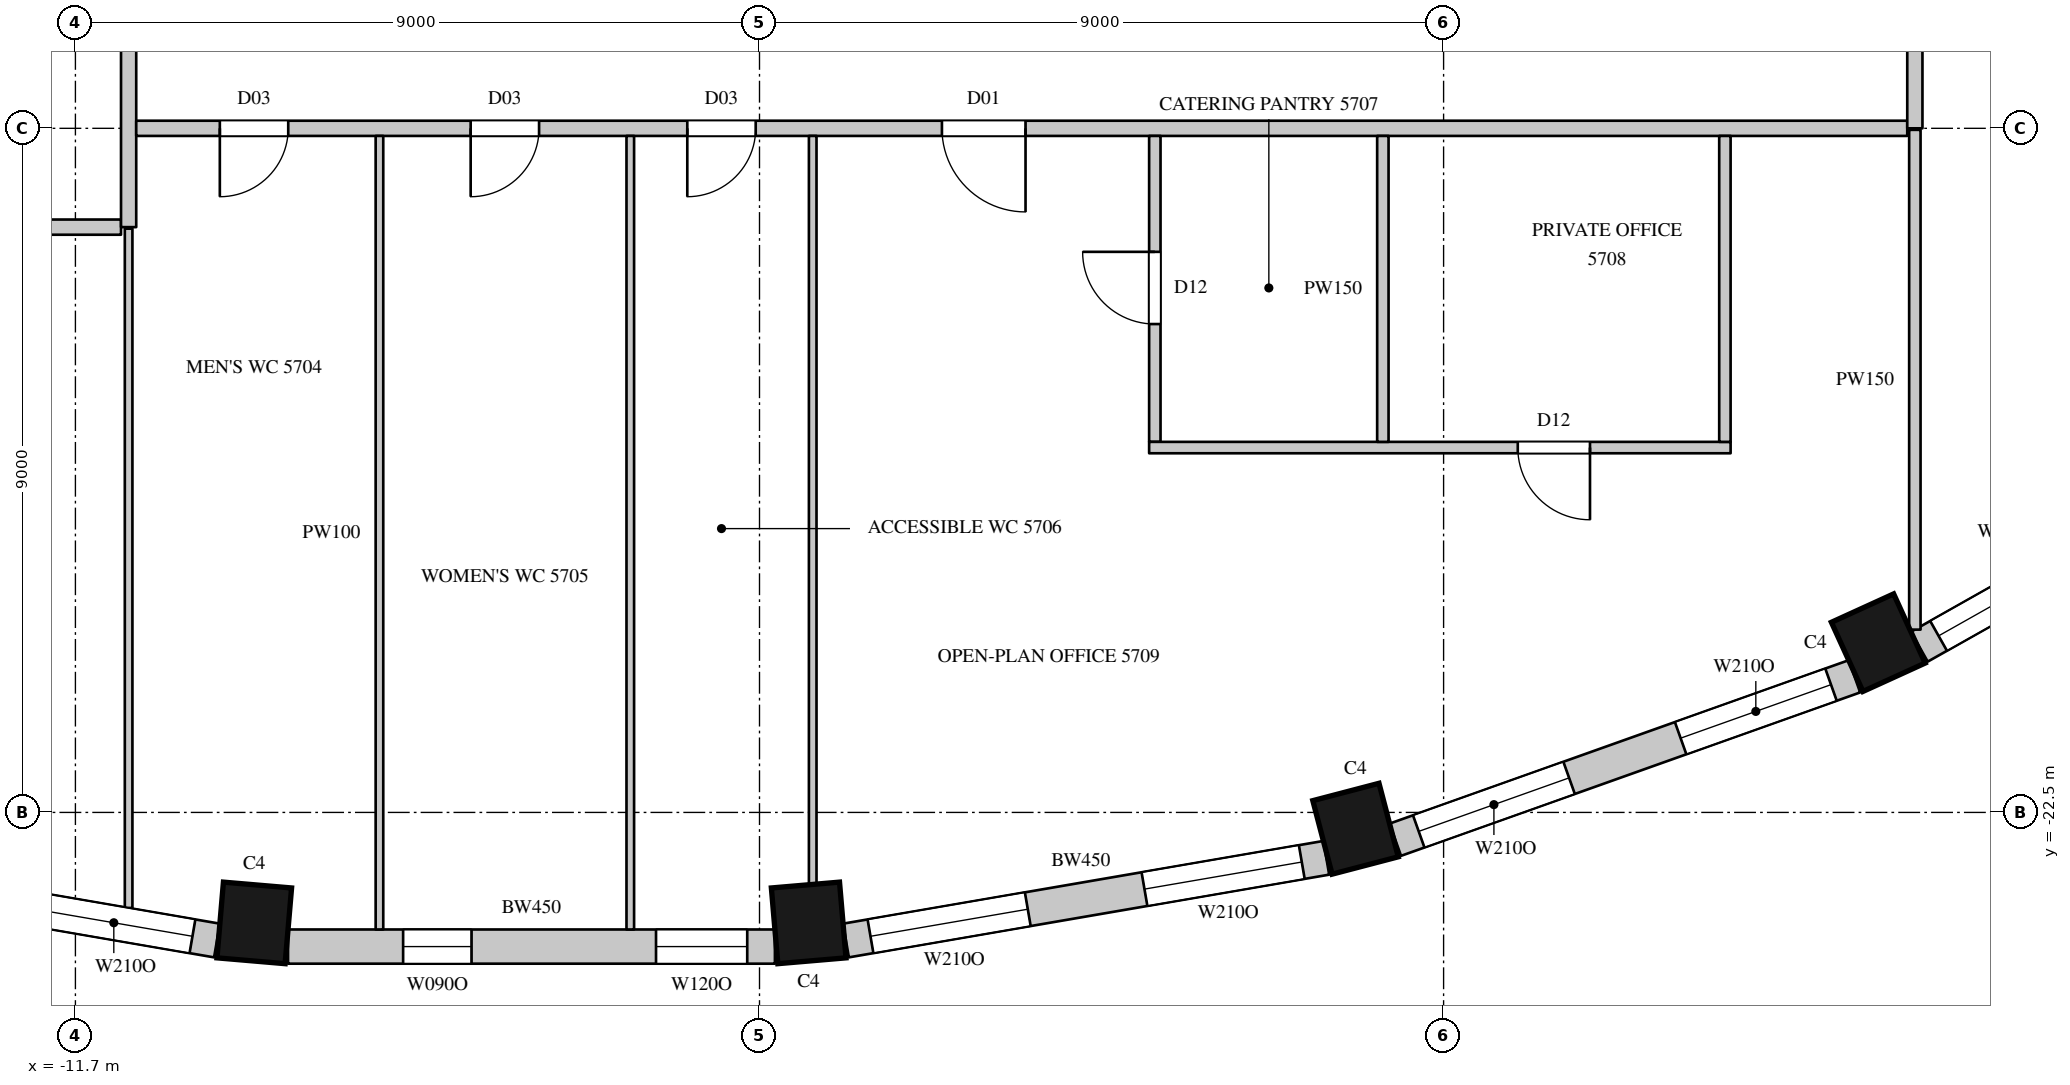
"""IFC4 building model, lengths in metres.
Left out: names, types, materials, properties, quantities, classifications, styles, units other than length and angle.
Written with IfcOpenShell. Run it as: python <this file> out.ifc"""

import sys

from ifc_helpers import new_model, si_unit, direction, frame, frame_2d, origin, origin_2d, place, context, subcontext, project, spatial, rectangle, extrude, element, fill, save


model = new_model("IFC4")
c1 = context("Model", 3, precision=1e-05, world=origin(), true_north=direction((0.0, 1.0)))
c2 = subcontext(c1, "Body", "Model", "MODEL_VIEW")
j1 = project(units=[si_unit("LENGTHUNIT", "METRE"), si_unit("PLANEANGLEUNIT", "RADIAN")], contexts=[c1])
p1 = place(None, origin())
s1 = spatial("IfcSite", under=j1, at=p1, CompositionType="ELEMENT")
p2 = place(p1, origin())
s2 = spatial("IfcBuilding", under=s1, at=p2, CompositionType="ELEMENT")
p3 = place(p2, frame((0.0, 0.0, 255.7)))
s3 = spatial("IfcBuildingStorey", under=s2, at=p3, CompositionType="ELEMENT", Elevation=255.7)
for number, where, z_axis, x_axis in (
    (1, (-9.347, -23.954, 0.0), (0.0, 0.0, 1.0), (0.996, -0.085, 0.0)),
    (2, (-2.053, -23.954, 0.0), (0.0, 0.0, 1.0), (0.996, 0.085, 0.0)),
    (3, (5.142, -22.715, 0.0), (0.0, 0.0, 1.0), (0.967, 0.253, 0.0)),
    (4, (12.019, -20.267, 0.0), (0.0, 0.0, 1.0), (0.91, 0.415, 0.0)),
):
    element("IfcColumn", number, at=place(p3, frame(where, z_axis=z_axis, x_axis=x_axis)), inside=s3, PredefinedType="COLUMN", context=c2, shape_type="SweptSolid", body=[
        extrude(rectangle(XDim=0.9, YDim=1.0, at=origin_2d()), origin(), (0.0, 0.0, 1.0), 4.1),
    ])
p4 = place(p3, frame((-16.157, -23.097, 0.0), z_axis=(0.0, 0.0, 1.0), x_axis=(0.985502073964, -0.169663379113, 0.0)))
e5 = element("IfcWall", 5, at=p4, inside=s3, PredefinedType="SOLIDWALL", context=c2, shape_type="SweptSolid", body=[
    extrude(rectangle(XDim=6.412, YDim=0.45, at=frame_2d((3.206, 0.0))), origin(), (0.0, 0.0, 1.0), 3.8),
])
p5 = place(p4, frame((0.327, 0.0, 1.05)))
e6 = element("IfcOpeningElement", 6, at=p5, cuts=e5, PredefinedType="OPENING", context=c2, shape_type="SweptSolid", body=[
    extrude(rectangle(XDim=2.1, YDim=2.4, at=frame_2d((1.05, 1.2))), frame((0.0, 0.235, 0.0), z_axis=(0.0, -1.0, 0.0), x_axis=(1.0, 0.0, 0.0)), (0.0, 0.0, 1.0), 0.47),
])
p6 = place(p4, frame((3.985, 0.0, 1.05)))
e7 = element("IfcOpeningElement", 7, at=p6, cuts=e5, PredefinedType="OPENING", context=c2, shape_type="SweptSolid", body=[
    extrude(rectangle(XDim=2.1, YDim=2.4, at=frame_2d((1.05, 1.2))), frame((0.0, 0.235, 0.0), z_axis=(0.0, -1.0, 0.0), x_axis=(1.0, 0.0, 0.0)), (0.0, 0.0, 1.0), 0.47),
])
p7 = place(p3, frame((-8.903, -24.265, 0.0), z_axis=(0.0, 0.0, 1.0), x_axis=(1.0, 0.0, 0.0)))
e8 = element("IfcWall", 8, at=p7, inside=s3, PredefinedType="SOLIDWALL", context=c2, shape_type="SweptSolid", body=[
    extrude(rectangle(XDim=6.406, YDim=0.45, at=frame_2d((3.203, 0.0))), origin(), (0.0, 0.0, 1.0), 3.8),
])
p8 = place(p7, frame((1.514, 0.0, 1.05)))
e9 = element("IfcOpeningElement", 9, at=p8, cuts=e8, PredefinedType="OPENING", context=c2, shape_type="SweptSolid", body=[
    extrude(rectangle(XDim=0.9, YDim=2.4, at=frame_2d((0.45, 1.2))), frame((0.0, 0.235, 0.0), z_axis=(0.0, -1.0, 0.0), x_axis=(1.0, 0.0, 0.0)), (0.0, 0.0, 1.0), 0.47),
])
p9 = place(p7, frame((4.841, 0.0, 1.05)))
e10 = element("IfcOpeningElement", 10, at=p9, cuts=e8, PredefinedType="OPENING", context=c2, shape_type="SweptSolid", body=[
    extrude(rectangle(XDim=1.2, YDim=2.4, at=frame_2d((0.6, 1.2))), frame((0.0, 0.235, 0.0), z_axis=(0.0, -1.0, 0.0), x_axis=(1.0, 0.0, 0.0)), (0.0, 0.0, 1.0), 0.47),
])
p10 = place(p3, frame((-1.562, -24.185, 0.0), z_axis=(0.0, 0.0, 1.0), x_axis=(0.985502073964, 0.169663379113, 0.0)))
e11 = element("IfcWall", 11, at=p10, inside=s3, PredefinedType="SOLIDWALL", context=c2, shape_type="SweptSolid", body=[
    extrude(rectangle(XDim=6.412, YDim=0.45, at=frame_2d((3.206, 0.0))), origin(), (0.0, 0.0, 1.0), 3.8),
])
p11 = place(p10, frame((0.327, 0.0, 1.05)))
e12 = element("IfcOpeningElement", 12, at=p11, cuts=e11, PredefinedType="OPENING", context=c2, shape_type="SweptSolid", body=[
    extrude(rectangle(XDim=2.1, YDim=2.4, at=frame_2d((1.05, 1.2))), frame((0.0, 0.235, 0.0), z_axis=(0.0, -1.0, 0.0), x_axis=(1.0, 0.0, 0.0)), (0.0, 0.0, 1.0), 0.47),
])
p12 = place(p10, frame((3.985, 0.0, 1.05)))
e13 = element("IfcOpeningElement", 13, at=p12, cuts=e11, PredefinedType="OPENING", context=c2, shape_type="SweptSolid", body=[
    extrude(rectangle(XDim=2.1, YDim=2.4, at=frame_2d((1.05, 1.2))), frame((0.0, 0.235, 0.0), z_axis=(0.0, -1.0, 0.0), x_axis=(1.0, 0.0, 0.0)), (0.0, 0.0, 1.0), 0.47),
])
p13 = place(p3, frame((5.665, -22.859, 0.0), z_axis=(0.0, 0.0, 1.0), x_axis=(0.942108340262, 0.335308626803, 0.0)))
e14 = element("IfcWall", 14, at=p13, inside=s3, PredefinedType="SOLIDWALL", context=c2, shape_type="SweptSolid", body=[
    extrude(rectangle(XDim=6.412, YDim=0.45, at=frame_2d((3.206, 0.0))), origin(), (0.0, 0.0, 1.0), 3.8),
])
p14 = place(p13, frame((0.327, 0.0, 1.05)))
e15 = element("IfcOpeningElement", 15, at=p14, cuts=e14, PredefinedType="OPENING", context=c2, shape_type="SweptSolid", body=[
    extrude(rectangle(XDim=2.1, YDim=2.4, at=frame_2d((1.05, 1.2))), frame((0.0, 0.235, 0.0), z_axis=(0.0, -1.0, 0.0), x_axis=(1.0, 0.0, 0.0)), (0.0, 0.0, 1.0), 0.47),
])
p15 = place(p13, frame((3.985, 0.0, 1.05)))
e16 = element("IfcOpeningElement", 16, at=p15, cuts=e14, PredefinedType="OPENING", context=c2, shape_type="SweptSolid", body=[
    extrude(rectangle(XDim=2.1, YDim=2.4, at=frame_2d((1.05, 1.2))), frame((0.0, 0.235, 0.0), z_axis=(0.0, -1.0, 0.0), x_axis=(1.0, 0.0, 0.0)), (0.0, 0.0, 1.0), 0.47),
])
p16 = place(p3, frame((12.559, -20.32, 0.0), z_axis=(0.0, 0.0, 1.0), x_axis=(0.871065783524, 0.491166367714, 0.0)))
e17 = element("IfcWall", 17, at=p16, inside=s3, PredefinedType="SOLIDWALL", context=c2, shape_type="SweptSolid", body=[
    extrude(rectangle(XDim=6.196, YDim=0.45, at=frame_2d((3.098, 0.0))), origin(), (0.0, 0.0, 1.0), 3.8),
])
p17 = place(p16, frame((0.291, 0.0, 1.05)))
e18 = element("IfcOpeningElement", 18, at=p17, cuts=e17, PredefinedType="OPENING", context=c2, shape_type="SweptSolid", body=[
    extrude(rectangle(XDim=2.1, YDim=2.4, at=frame_2d((1.05, 1.2))), frame((0.0, 0.235, 0.0), z_axis=(0.0, -1.0, 0.0), x_axis=(1.0, 0.0, 0.0)), (0.0, 0.0, 1.0), 0.47),
])
p18 = place(p16, frame((3.875, 0.0, 1.05)))
e19 = element("IfcOpeningElement", 19, at=p18, cuts=e17, PredefinedType="OPENING", context=c2, shape_type="SweptSolid", body=[
    extrude(rectangle(XDim=2.1, YDim=2.4, at=frame_2d((1.05, 1.2))), frame((0.0, 0.235, 0.0), z_axis=(0.0, -1.0, 0.0), x_axis=(1.0, 0.0, 0.0)), (0.0, 0.0, 1.0), 0.47),
])
p19 = place(p3, frame((-13.97, -14.8, 0.0), z_axis=(0.0, 0.0, 1.0), x_axis=(1.0, 0.0, 0.0)))
e20 = element("IfcWall", 20, at=p19, inside=s3, PredefinedType="PARTITIONING", context=c2, shape_type="SweptSolid", body=[
    extrude(rectangle(XDim=2.87, YDim=0.2, at=frame_2d((1.435, 0.0))), origin(), (0.0, 0.0, 1.0), 3.8),
])
p20 = place(p3, frame((-11.0, -14.8, 0.0), z_axis=(0.0, 0.0, 1.0), x_axis=(0.0, 1.0, 0.0)))
e21 = element("IfcWall", 21, at=p20, inside=s3, PredefinedType="PARTITIONING", context=c2, shape_type="SweptSolid", body=[
    extrude(rectangle(XDim=29.5, YDim=0.2, at=frame_2d((14.75, 0.0))), origin(), (0.0, 0.0, 1.0), 3.8),
])
p21 = place(p20, frame((14.05, 0.0, 0.0)))
e22 = element("IfcOpeningElement", 22, at=p21, cuts=e21, PredefinedType="OPENING", context=c2, shape_type="SweptSolid", body=[
    extrude(rectangle(XDim=1.5, YDim=2.4, at=frame_2d((0.75, 1.2))), frame((0.0, 0.11, 0.0), z_axis=(0.0, -1.0, 0.0), x_axis=(1.0, 0.0, 0.0)), (0.0, 0.0, 1.0), 0.22),
])
p22 = place(p3, frame((-10.9, -13.5, 0.0), z_axis=(0.0, 0.0, 1.0), x_axis=(1.0, 0.0, 0.0)))
e23 = element("IfcWall", 23, at=p22, inside=s3, PredefinedType="PARTITIONING", context=c2, shape_type="SweptSolid", body=[
    extrude(rectangle(XDim=23.3, YDim=0.2, at=frame_2d((11.65, 0.0))), origin(), (0.0, 0.0, 1.0), 3.8),
])
p23 = place(p22, frame((1.1, 0.0, 0.0)))
e24 = element("IfcOpeningElement", 24, at=p23, cuts=e23, PredefinedType="OPENING", context=c2, shape_type="SweptSolid", body=[
    extrude(rectangle(XDim=0.9, YDim=2.2, at=frame_2d((0.45, 1.1))), frame((0.0, 0.11, 0.0), z_axis=(0.0, -1.0, 0.0), x_axis=(1.0, 0.0, 0.0)), (0.0, 0.0, 1.0), 0.22),
])
p24 = place(p22, frame((4.4, 0.0, 0.0)))
e25 = element("IfcOpeningElement", 25, at=p24, cuts=e23, PredefinedType="OPENING", context=c2, shape_type="SweptSolid", body=[
    extrude(rectangle(XDim=0.9, YDim=2.2, at=frame_2d((0.45, 1.1))), frame((0.0, 0.11, 0.0), z_axis=(0.0, -1.0, 0.0), x_axis=(1.0, 0.0, 0.0)), (0.0, 0.0, 1.0), 0.22),
])
p25 = place(p22, frame((7.25, 0.0, 0.0)))
e26 = element("IfcOpeningElement", 26, at=p25, cuts=e23, PredefinedType="OPENING", context=c2, shape_type="SweptSolid", body=[
    extrude(rectangle(XDim=0.9, YDim=2.2, at=frame_2d((0.45, 1.1))), frame((0.0, 0.11, 0.0), z_axis=(0.0, -1.0, 0.0), x_axis=(1.0, 0.0, 0.0)), (0.0, 0.0, 1.0), 0.22),
])
p26 = place(p22, frame((10.6, 0.0, 0.0)))
e27 = element("IfcOpeningElement", 27, at=p26, cuts=e23, PredefinedType="OPENING", context=c2, shape_type="SweptSolid", body=[
    extrude(rectangle(XDim=1.1, YDim=2.4, at=frame_2d((0.55, 1.2))), frame((0.0, 0.11, 0.0), z_axis=(0.0, -1.0, 0.0), x_axis=(1.0, 0.0, 0.0)), (0.0, 0.0, 1.0), 0.22),
])
p27 = place(p3, frame((12.5, -13.5, 0.0), z_axis=(0.0, 0.0, 1.0), x_axis=(0.0, 1.0, 0.0)))
e28 = element("IfcWall", 28, at=p27, inside=s3, PredefinedType="PARTITIONING", context=c2, shape_type="SweptSolid", body=[
    extrude(rectangle(XDim=26.9, YDim=0.2, at=frame_2d((13.45, 0.0))), origin(), (0.0, 0.0, 1.0), 3.8),
])
p28 = place(p27, frame((12.75, 0.0, 0.0)))
e29 = element("IfcOpeningElement", 29, at=p28, cuts=e28, PredefinedType="OPENING", context=c2, shape_type="SweptSolid", body=[
    extrude(rectangle(XDim=1.5, YDim=2.4, at=frame_2d((0.75, 1.2))), frame((0.0, 0.11, 0.0), z_axis=(0.0, -1.0, 0.0), x_axis=(1.0, 0.0, 0.0)), (0.0, 0.0, 1.0), 0.22),
])
p29 = place(p3, frame((2.501, -17.625, 0.0), z_axis=(0.0, 0.0, 1.0), x_axis=(0.0, 1.0, 0.0)))
e30 = element("IfcWall", 30, at=p29, inside=s3, PredefinedType="PARTITIONING", context=c2, shape_type="SweptSolid", body=[
    extrude(rectangle(XDim=4.025, YDim=0.15, at=frame_2d((2.012, 0.0))), origin(), (0.0, 0.0, 1.0), 3.8),
])
p30 = place(p29, frame((1.55, 0.0, 0.0)))
e31 = element("IfcOpeningElement", 31, at=p30, cuts=e30, PredefinedType="OPENING", context=c2, shape_type="SweptSolid", body=[
    extrude(rectangle(XDim=0.95, YDim=2.2, at=frame_2d((0.475, 1.1))), frame((0.0, 0.085, 0.0), z_axis=(0.0, -1.0, 0.0), x_axis=(1.0, 0.0, 0.0)), (0.0, 0.0, 1.0), 0.17),
])
p31 = place(p3, frame((2.426, -17.7, 0.0), z_axis=(0.0, 0.0, 1.0), x_axis=(1.0, 0.0, 0.0)))
e32 = element("IfcWall", 32, at=p31, inside=s3, PredefinedType="PARTITIONING", context=c2, shape_type="SweptSolid", body=[
    extrude(rectangle(XDim=7.65, YDim=0.15, at=frame_2d((3.825, 0.0))), origin(), (0.0, 0.0, 1.0), 3.8),
])
p32 = place(p31, frame((4.85, 0.0, 0.0)))
e33 = element("IfcOpeningElement", 33, at=p32, cuts=e32, PredefinedType="OPENING", context=c2, shape_type="SweptSolid", body=[
    extrude(rectangle(XDim=0.95, YDim=2.2, at=frame_2d((0.475, 1.1))), frame((0.0, 0.085, 0.0), z_axis=(0.0, -1.0, 0.0), x_axis=(1.0, 0.0, 0.0)), (0.0, 0.0, 1.0), 0.17),
])
for number, where, z_axis, x_axis in (
    (34, (5.501, -17.625, 0.0), (0.0, 0.0, 1.0), (0.0, 1.0, 0.0)),
    (35, (10.001, -17.625, 0.0), (0.0, 0.0, 1.0), (0.0, 1.0, 0.0)),
):
    element("IfcWall", number, at=place(p3, frame(where, z_axis=z_axis, x_axis=x_axis)), inside=s3, PredefinedType="PARTITIONING", context=c2, shape_type="SweptSolid", body=[
        extrude(rectangle(XDim=4.025, YDim=0.15, at=frame_2d((2.012, 0.0))), origin(), (0.0, 0.0, 1.0), 3.8),
    ])
p33 = place(p3, frame((12.5, -20.095, 0.0), z_axis=(0.0, 0.0, 1.0), x_axis=(0.0, 1.0, 0.0)))
e36 = element("IfcWall", 36, at=p33, inside=s3, PredefinedType="PARTITIONING", context=c2, shape_type="SweptSolid", body=[
    extrude(rectangle(XDim=6.575, YDim=0.15, at=frame_2d((3.288, 0.0))), origin(), (0.0, 0.0, 1.0), 3.8),
])
p34 = place(p3, frame((-11.0, -23.757, 0.0), z_axis=(0.0, 0.0, 1.0), x_axis=(0.0, 1.0, 0.0)))
e37 = element("IfcWall", 37, at=p34, inside=s3, PredefinedType="PARTITIONING", context=c2, shape_type="SweptSolid", body=[
    extrude(rectangle(XDim=8.937, YDim=0.1, at=frame_2d((4.468, 0.0))), origin(), (0.0, 0.0, 1.0), 3.8),
])
for number, where, z_axis, x_axis in (
    (38, (-7.7, -24.04, 0.0), (0.0, 0.0, 1.0), (0.0, 1.0, 0.0)),
    (39, (-4.4, -24.04, 0.0), (0.0, 0.0, 1.0), (0.0, 1.0, 0.0)),
):
    element("IfcWall", number, at=place(p3, frame(where, z_axis=z_axis, x_axis=x_axis)), inside=s3, PredefinedType="PARTITIONING", context=c2, shape_type="SweptSolid", body=[
        extrude(rectangle(XDim=10.44, YDim=0.1, at=frame_2d((5.22, 0.0))), origin(), (0.0, 0.0, 1.0), 3.8),
    ])
p35 = place(p3, frame((-2.0, -23.447, 0.0), z_axis=(0.0, 0.0, 1.0), x_axis=(0.0, 1.0, 0.0)))
e40 = element("IfcWall", 40, at=p35, inside=s3, PredefinedType="PARTITIONING", context=c2, shape_type="SweptSolid", body=[
    extrude(rectangle(XDim=9.847, YDim=0.1, at=frame_2d((4.924, 0.0))), origin(), (0.0, 0.0, 1.0), 3.8),
])
p36 = place(p6, origin())
e41 = element("IfcWindow", 41, at=p36, inside=s3, PartitioningType="SINGLE_PANEL", PredefinedType="WINDOW", context=c2, shape_type="SweptSolid", body=[
    extrude(rectangle(XDim=2.1, YDim=2.4, at=frame_2d((1.05, 1.2))), frame((0.0, 0.135, 0.0), z_axis=(0.0, -1.0, 0.0), x_axis=(1.0, 0.0, 0.0)), (0.0, 0.0, 1.0), 0.06),
])
fill(e7, e41)
p37 = place(p11, origin())
e42 = element("IfcWindow", 42, at=p37, inside=s3, PartitioningType="SINGLE_PANEL", PredefinedType="WINDOW", context=c2, shape_type="SweptSolid", body=[
    extrude(rectangle(XDim=2.1, YDim=2.4, at=frame_2d((1.05, 1.2))), frame((0.0, 0.135, 0.0), z_axis=(0.0, -1.0, 0.0), x_axis=(1.0, 0.0, 0.0)), (0.0, 0.0, 1.0), 0.06),
])
fill(e12, e42)
p38 = place(p12, origin())
e43 = element("IfcWindow", 43, at=p38, inside=s3, PartitioningType="SINGLE_PANEL", PredefinedType="WINDOW", context=c2, shape_type="SweptSolid", body=[
    extrude(rectangle(XDim=2.1, YDim=2.4, at=frame_2d((1.05, 1.2))), frame((0.0, 0.135, 0.0), z_axis=(0.0, -1.0, 0.0), x_axis=(1.0, 0.0, 0.0)), (0.0, 0.0, 1.0), 0.06),
])
fill(e13, e43)
p39 = place(p14, origin())
e44 = element("IfcWindow", 44, at=p39, inside=s3, PartitioningType="SINGLE_PANEL", PredefinedType="WINDOW", context=c2, shape_type="SweptSolid", body=[
    extrude(rectangle(XDim=2.1, YDim=2.4, at=frame_2d((1.05, 1.2))), frame((0.0, 0.135, 0.0), z_axis=(0.0, -1.0, 0.0), x_axis=(1.0, 0.0, 0.0)), (0.0, 0.0, 1.0), 0.06),
])
fill(e15, e44)
p40 = place(p15, origin())
e45 = element("IfcWindow", 45, at=p40, inside=s3, PartitioningType="SINGLE_PANEL", PredefinedType="WINDOW", context=c2, shape_type="SweptSolid", body=[
    extrude(rectangle(XDim=2.1, YDim=2.4, at=frame_2d((1.05, 1.2))), frame((0.0, 0.135, 0.0), z_axis=(0.0, -1.0, 0.0), x_axis=(1.0, 0.0, 0.0)), (0.0, 0.0, 1.0), 0.06),
])
fill(e16, e45)
p41 = place(p17, origin())
e46 = element("IfcWindow", 46, at=p41, inside=s3, PartitioningType="SINGLE_PANEL", PredefinedType="WINDOW", context=c2, shape_type="SweptSolid", body=[
    extrude(rectangle(XDim=2.1, YDim=2.4, at=frame_2d((1.05, 1.2))), frame((0.0, 0.135, 0.0), z_axis=(0.0, -1.0, 0.0), x_axis=(1.0, 0.0, 0.0)), (0.0, 0.0, 1.0), 0.06),
])
fill(e18, e46)
p42 = place(p23, origin())
e47 = element("IfcDoor", 47, at=p42, inside=s3, OperationType="SINGLE_SWING_RIGHT", PredefinedType="DOOR", context=c2, shape_type="SweptSolid", body=[
    extrude(rectangle(XDim=0.9, YDim=2.2, at=frame_2d((0.45, 1.1))), frame((0.0, 0.025, 0.0), z_axis=(0.0, -1.0, 0.0), x_axis=(1.0, 0.0, 0.0)), (0.0, 0.0, 1.0), 0.05),
])
fill(e24, e47)
p43 = place(p24, origin())
e48 = element("IfcDoor", 48, at=p43, inside=s3, OperationType="SINGLE_SWING_RIGHT", PredefinedType="DOOR", context=c2, shape_type="SweptSolid", body=[
    extrude(rectangle(XDim=0.9, YDim=2.2, at=frame_2d((0.45, 1.1))), frame((0.0, 0.025, 0.0), z_axis=(0.0, -1.0, 0.0), x_axis=(1.0, 0.0, 0.0)), (0.0, 0.0, 1.0), 0.05),
])
fill(e25, e48)
p44 = place(p25, origin())
e49 = element("IfcDoor", 49, at=p44, inside=s3, OperationType="SINGLE_SWING_RIGHT", PredefinedType="DOOR", context=c2, shape_type="SweptSolid", body=[
    extrude(rectangle(XDim=0.9, YDim=2.2, at=frame_2d((0.45, 1.1))), frame((0.0, 0.025, 0.0), z_axis=(0.0, -1.0, 0.0), x_axis=(1.0, 0.0, 0.0)), (0.0, 0.0, 1.0), 0.05),
])
fill(e26, e49)
p45 = place(p26, origin())
e50 = element("IfcDoor", 50, at=p45, inside=s3, OperationType="SINGLE_SWING_LEFT", PredefinedType="DOOR", context=c2, shape_type="SweptSolid", body=[
    extrude(rectangle(XDim=1.1, YDim=2.4, at=frame_2d((0.55, 1.2))), frame((0.0, 0.025, 0.0), z_axis=(0.0, -1.0, 0.0), x_axis=(1.0, 0.0, 0.0)), (0.0, 0.0, 1.0), 0.05),
])
fill(e27, e50)
p46 = place(p30, origin())
e51 = element("IfcDoor", 51, at=p46, inside=s3, OperationType="SINGLE_SWING_RIGHT", PredefinedType="DOOR", context=c2, shape_type="SweptSolid", body=[
    extrude(rectangle(XDim=0.95, YDim=2.2, at=frame_2d((0.475, 1.1))), frame((0.0, 0.025, 0.0), z_axis=(0.0, -1.0, 0.0), x_axis=(1.0, 0.0, 0.0)), (0.0, 0.0, 1.0), 0.05),
])
fill(e31, e51)
p47 = place(p32, origin())
e52 = element("IfcDoor", 52, at=p47, inside=s3, OperationType="SINGLE_SWING_LEFT", PredefinedType="DOOR", context=c2, shape_type="SweptSolid", body=[
    extrude(rectangle(XDim=0.95, YDim=2.2, at=frame_2d((0.475, 1.1))), frame((0.0, 0.025, 0.0), z_axis=(0.0, -1.0, 0.0), x_axis=(1.0, 0.0, 0.0)), (0.0, 0.0, 1.0), 0.05),
])
fill(e33, e52)
p48 = place(p8, origin())
e53 = element("IfcWindow", 53, at=p48, inside=s3, PartitioningType="SINGLE_PANEL", PredefinedType="WINDOW", context=c2, shape_type="SweptSolid", body=[
    extrude(rectangle(XDim=0.9, YDim=2.4, at=frame_2d((0.45, 1.2))), frame((0.0, 0.135, 0.0), z_axis=(0.0, -1.0, 0.0), x_axis=(1.0, 0.0, 0.0)), (0.0, 0.0, 1.0), 0.06),
])
fill(e9, e53)
p49 = place(p9, origin())
e54 = element("IfcWindow", 54, at=p49, inside=s3, PartitioningType="SINGLE_PANEL", PredefinedType="WINDOW", context=c2, shape_type="SweptSolid", body=[
    extrude(rectangle(XDim=1.2, YDim=2.4, at=frame_2d((0.6, 1.2))), frame((0.0, 0.135, 0.0), z_axis=(0.0, -1.0, 0.0), x_axis=(1.0, 0.0, 0.0)), (0.0, 0.0, 1.0), 0.06),
])
fill(e10, e54)
save(model, sys.argv[1])
